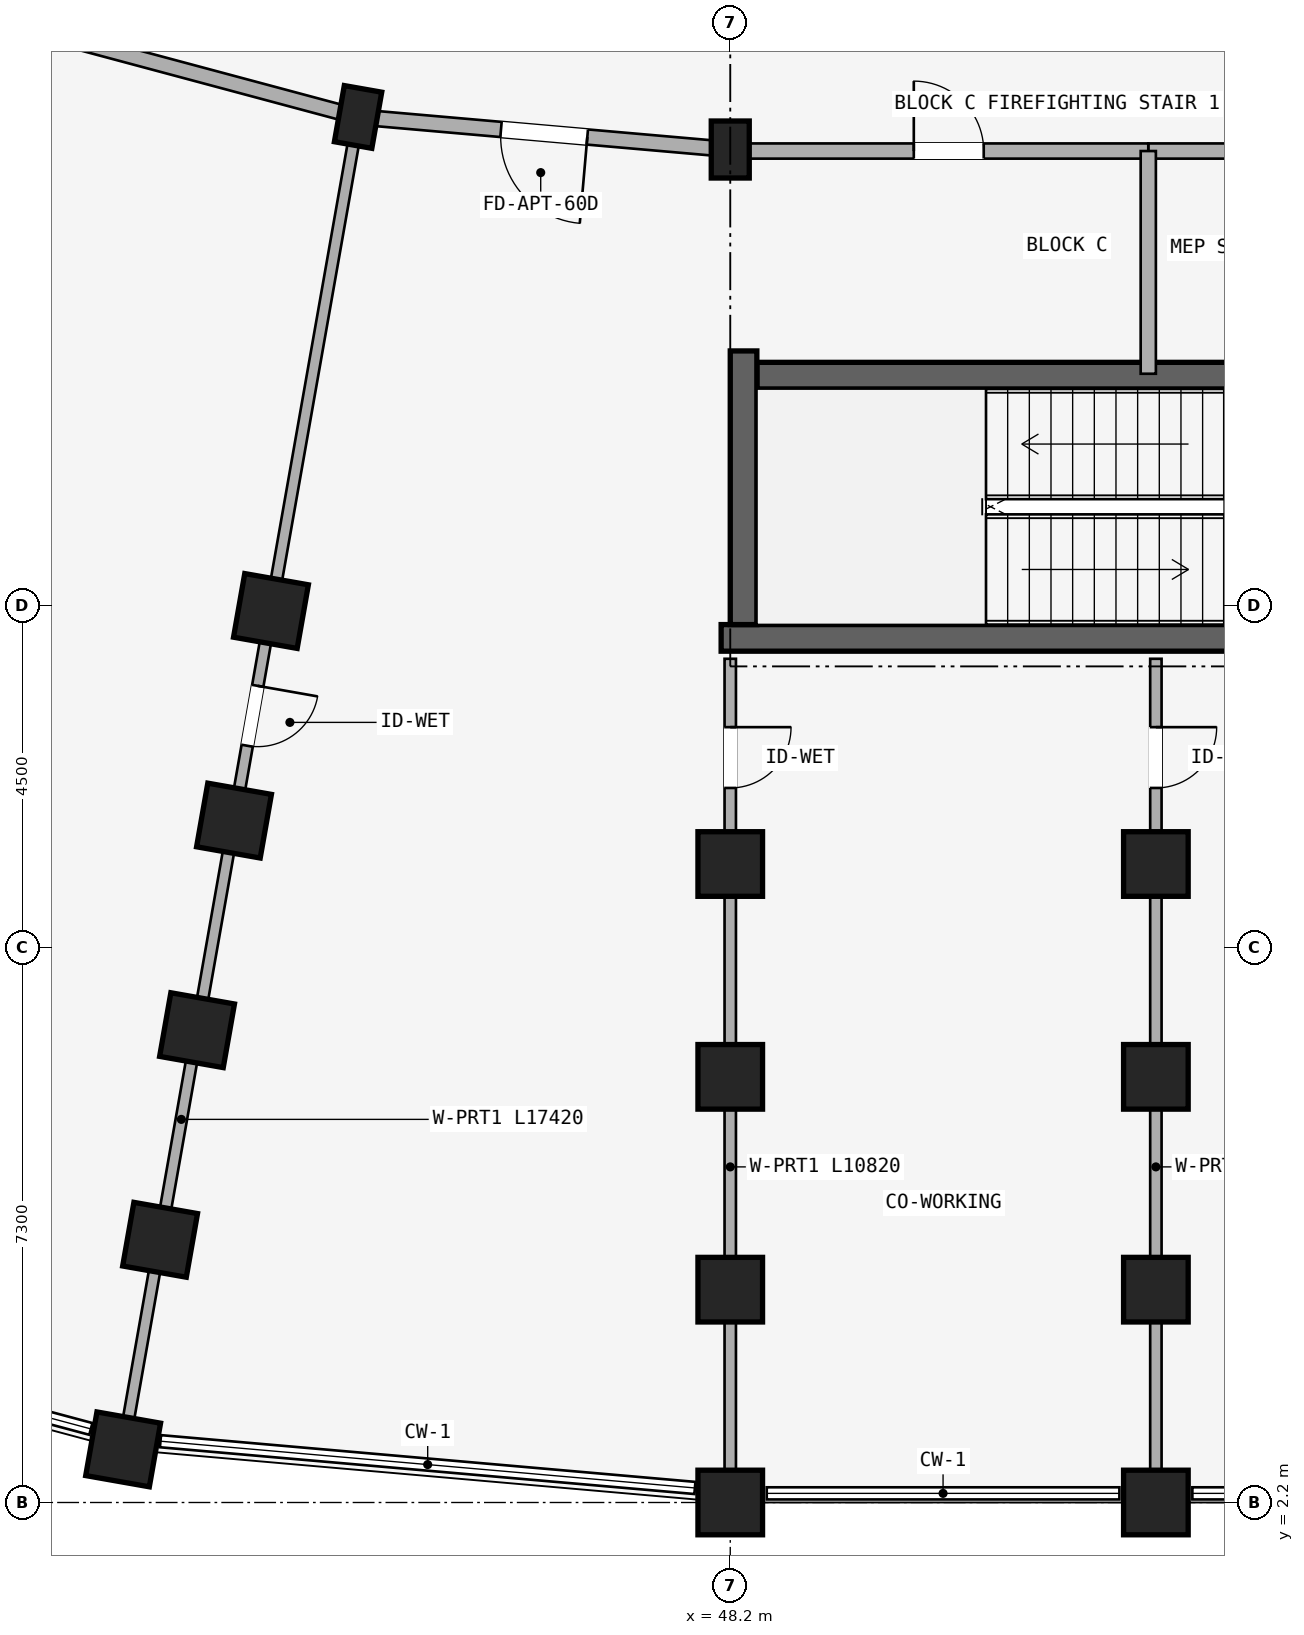
"""IFC4 building model, lengths in metres.
Left out: names, types, materials, properties, quantities, classifications, styles, units other than length and angle.
Written with IfcOpenShell. Run it as: python <this file> out.ifc"""

import sys

from ifc_helpers import new_model, si_unit, direction, frame, frame_2d, origin, origin_2d, place, context, subcontext, project, spatial, rectangle, extrude, element, fill, save


model = new_model("IFC4")
c1 = context("Model", 3, precision=1e-05, world=origin(), true_north=direction((0.0, 1.0)))
c2 = subcontext(c1, "Body", "Model", "MODEL_VIEW")
j1 = project(units=[si_unit("LENGTHUNIT", "METRE"), si_unit("PLANEANGLEUNIT", "RADIAN")], contexts=[c1])
p1 = place(None, origin())
s1 = spatial("IfcSite", under=j1, at=p1, CompositionType="ELEMENT")
p2 = place(p1, origin())
s2 = spatial("IfcBuilding", under=s1, at=p2, CompositionType="ELEMENT")
p3 = place(p2, frame((0.0, 0.0, 4.5)))
s3 = spatial("IfcBuildingStorey", under=s2, at=p3, CompositionType="ELEMENT", Elevation=4.5)
p4 = place(p3, frame((48.08, 13.575, 0.0), z_axis=(0.0, 0.0, 1.0), x_axis=(1.0, 0.0, 0.0)))
e1 = element("IfcWall", 1, at=p4, inside=s3, PredefinedType="SHEAR", context=c2, shape_type="SweptSolid", body=[
    extrude(rectangle(XDim=8.545, YDim=0.35, at=frame_2d((4.272, 0.0))), origin(), (0.0, 0.0, 1.0), 3.98),
])
p5 = place(p3, frame((48.55, 17.025, 0.0), z_axis=(0.0, 0.0, 1.0), x_axis=(1.0, 0.0, 0.0)))
e2 = element("IfcWall", 2, at=p5, inside=s3, PredefinedType="SHEAR", context=c2, shape_type="SweptSolid", body=[
    extrude(rectangle(XDim=8.075, YDim=0.35, at=frame_2d((4.038, 0.0))), origin(), (0.0, 0.0, 1.0), 3.98),
])
p6 = place(p5, frame((6.38, 0.0, 0.0)))
e3 = element("IfcOpeningElement", 3, at=p6, cuts=e2, PredefinedType="OPENING", context=c2, shape_type="SweptSolid", body=[
    extrude(rectangle(XDim=1.24, YDim=2.15, at=frame_2d((0.62, 1.075))), frame((0.0, 0.185, 0.0), z_axis=(0.0, -1.0, 0.0), x_axis=(1.0, 0.0, 0.0)), (0.0, 0.0, 1.0), 0.37),
])
p7 = place(p3, frame((48.375, 17.35, 0.0), z_axis=(0.0, 0.0, 1.0), x_axis=(0.0, -1.0, 0.0)))
e4 = element("IfcWall", 4, at=p7, inside=s3, PredefinedType="SHEAR", context=c2, shape_type="SweptSolid", body=[
    extrude(rectangle(XDim=3.6, YDim=0.35, at=frame_2d((1.8, 0.0))), origin(), (0.0, 0.0, 1.0), 3.98),
])
p8 = place(p3, frame((48.2, 20.0, 0.0), z_axis=(0.0, 0.0, 1.0), x_axis=(1.0, 0.0, 0.0)))
e5 = element("IfcColumn", 5, at=p8, inside=s3, PredefinedType="COLUMN", context=c2, shape_type="SweptSolid", body=[
    extrude(rectangle(XDim=0.5, YDim=0.75, at=origin_2d()), origin(), (0.0, 0.0, 1.0), 3.98),
])
for number, where, z_axis, x_axis in (
    (6, (48.2, 10.6, 0.0), (0.0, 0.0, 1.0), (1.0, 0.0, 0.0)),
    (7, (48.2, 7.8, 0.0), (0.0, 0.0, 1.0), (1.0, 0.0, 0.0)),
    (8, (48.2, 5.0, 0.0), (0.0, 0.0, 1.0), (1.0, 0.0, 0.0)),
    (9, (48.2, 2.2, 0.0), (0.0, 0.0, 1.0), (1.0, 0.0, 0.0)),
):
    element("IfcColumn", number, at=place(p3, frame(where, z_axis=z_axis, x_axis=x_axis)), inside=s3, PredefinedType="COLUMN", context=c2, shape_type="SweptSolid", body=[
        extrude(rectangle(XDim=0.85, YDim=0.85, at=origin_2d()), origin(), (0.0, 0.0, 1.0), 3.98),
    ])
p9 = place(p3, frame((43.303, 20.428, 0.0), z_axis=(0.0, 0.0, 1.0), x_axis=(-0.984807753012, 0.173648177667, 0.0)))
e10 = element("IfcColumn", 10, at=p9, inside=s3, PredefinedType="COLUMN", context=c2, shape_type="SweptSolid", body=[
    extrude(rectangle(XDim=0.5, YDim=0.75, at=origin_2d()), origin(), (0.0, 0.0, 1.0), 3.98),
])
for number, where, z_axis, x_axis in (
    (11, (42.157, 13.929, 0.0), (0.0, 0.0, 1.0), (-0.985, 0.174, 0.0)),
    (12, (41.671, 11.171, 0.0), (0.0, 0.0, 1.0), (-0.985, 0.174, 0.0)),
    (13, (41.185, 8.414, 0.0), (0.0, 0.0, 1.0), (-0.985, 0.174, 0.0)),
    (14, (40.698, 5.656, 0.0), (0.0, 0.0, 1.0), (-0.985, 0.174, 0.0)),
    (15, (40.212, 2.899, 0.0), (0.0, 0.0, 1.0), (-0.985, 0.174, 0.0)),
    (16, (53.8, 10.6, 0.0), (0.0, 0.0, 1.0), (1.0, 0.0, 0.0)),
    (17, (53.8, 7.8, 0.0), (0.0, 0.0, 1.0), (1.0, 0.0, 0.0)),
    (18, (53.8, 5.0, 0.0), (0.0, 0.0, 1.0), (1.0, 0.0, 0.0)),
    (19, (53.8, 2.2, 0.0), (0.0, 0.0, 1.0), (1.0, 0.0, 0.0)),
):
    element("IfcColumn", number, at=place(p3, frame(where, z_axis=z_axis, x_axis=x_axis)), inside=s3, PredefinedType="COLUMN", context=c2, shape_type="SweptSolid", body=[
        extrude(rectangle(XDim=0.85, YDim=0.85, at=origin_2d()), origin(), (0.0, 0.0, 1.0), 3.98),
    ])
p10 = place(p3, frame((53.7, 19.98, 0.0), z_axis=(0.0, 0.0, 1.0), x_axis=(1.0, 0.0, 0.0)))
e20 = element("IfcWall", 20, at=p10, inside=s3, PredefinedType="STANDARD", context=c2, shape_type="SweptSolid", body=[
    extrude(rectangle(XDim=5.65, YDim=0.2, at=frame_2d((2.825, 0.0))), origin(), (0.0, 0.0, 1.0), 3.322),
])
p11 = place(p10, frame((1.923, 0.0, 0.0)))
e21 = element("IfcOpeningElement", 21, at=p11, cuts=e20, PredefinedType="OPENING", context=c2, shape_type="SweptSolid", body=[
    extrude(rectangle(XDim=1.24, YDim=2.15, at=frame_2d((0.62, 1.075))), frame((0.0, 0.11, 0.0), z_axis=(0.0, -1.0, 0.0), x_axis=(1.0, 0.0, 0.0)), (0.0, 0.0, 1.0), 0.22),
])
p12 = place(p3, frame((48.45, 19.98, 0.0), z_axis=(0.0, 0.0, 1.0), x_axis=(1.0, 0.0, 0.0)))
e22 = element("IfcWall", 22, at=p12, inside=s3, PredefinedType="STANDARD", context=c2, shape_type="SweptSolid", body=[
    extrude(rectangle(XDim=5.25, YDim=0.2, at=frame_2d((2.625, 0.0))), origin(), (0.0, 0.0, 1.0), 3.322),
])
p13 = place(p12, frame((2.165, 0.0, 0.0)))
e23 = element("IfcOpeningElement", 23, at=p13, cuts=e22, PredefinedType="OPENING", context=c2, shape_type="SweptSolid", body=[
    extrude(rectangle(XDim=0.92, YDim=2.1, at=frame_2d((0.46, 1.05))), frame((0.0, 0.11, 0.0), z_axis=(0.0, -1.0, 0.0), x_axis=(1.0, 0.0, 0.0)), (0.0, 0.0, 1.0), 0.22),
])
p14 = place(p3, frame((53.7, 19.98, 0.0), z_axis=(0.0, 0.0, 1.0), x_axis=(0.0, -1.0, 0.0)))
e24 = element("IfcWall", 24, at=p14, inside=s3, PredefinedType="STANDARD", context=c2, shape_type="SweptSolid", body=[
    extrude(rectangle(XDim=2.93, YDim=0.2, at=frame_2d((1.465, 0.0))), origin(), (0.0, 0.0, 1.0), 3.322),
])
p15 = place(p3, frame((53.8, 13.3, 0.0), z_axis=(0.0, 0.0, 1.0), x_axis=(0.0, -1.0, 0.0)))
e25 = element("IfcWall", 25, at=p15, inside=s3, PredefinedType="PARTITIONING", context=c2, shape_type="SweptSolid", body=[
    extrude(rectangle(XDim=10.82, YDim=0.15, at=frame_2d((5.41, 0.0))), origin(), (0.0, 0.0, 1.0), 3.322),
])
p16 = place(p15, frame((0.899, 0.0, 0.0)))
e26 = element("IfcOpeningElement", 26, at=p16, cuts=e25, PredefinedType="OPENING", context=c2, shape_type="SweptSolid", body=[
    extrude(rectangle(XDim=0.8, YDim=2.1, at=frame_2d((0.4, 1.05))), frame((0.0, 0.085, 0.0), z_axis=(0.0, -1.0, 0.0), x_axis=(1.0, 0.0, 0.0)), (0.0, 0.0, 1.0), 0.17),
])
p17 = place(p3, frame((48.2, 20.0, 0.0), z_axis=(0.0, 0.0, 1.0), x_axis=(-0.996193663584, 0.087167566415, 0.0)))
e27 = element("IfcWall", 27, at=p17, inside=s3, PredefinedType="STANDARD", context=c2, shape_type="SweptSolid", body=[
    extrude(rectangle(XDim=4.916, YDim=0.2, at=frame_2d((2.458, 0.0))), origin(), (0.0, 0.0, 1.0), 3.322),
])
p18 = place(p17, frame((1.888, 0.0, 0.0)))
e28 = element("IfcOpeningElement", 28, at=p18, cuts=e27, PredefinedType="OPENING", context=c2, shape_type="SweptSolid", body=[
    extrude(rectangle(XDim=1.14, YDim=2.15, at=frame_2d((0.57, 1.075))), frame((0.0, 0.11, 0.0), z_axis=(0.0, -1.0, 0.0), x_axis=(1.0, 0.0, 0.0)), (0.0, 0.0, 1.0), 0.22),
])
p19 = place(p3, frame((43.303, 20.428, 0.0), z_axis=(0.0, 0.0, 1.0), x_axis=(-0.965930095386, 0.258803112091, 0.0)))
e29 = element("IfcWall", 29, at=p19, inside=s3, PredefinedType="STANDARD", context=c2, shape_type="SweptSolid", body=[
    extrude(rectangle(XDim=4.916, YDim=0.2, at=frame_2d((2.458, 0.0))), origin(), (0.0, 0.0, 1.0), 3.322),
])
p20 = place(p3, frame((48.2, 13.3, 0.0), z_axis=(0.0, 0.0, 1.0), x_axis=(0.0, -1.0, 0.0)))
e30 = element("IfcWall", 30, at=p20, inside=s3, PredefinedType="PARTITIONING", context=c2, shape_type="SweptSolid", body=[
    extrude(rectangle(XDim=10.82, YDim=0.15, at=frame_2d((5.41, 0.0))), origin(), (0.0, 0.0, 1.0), 3.322),
])
p21 = place(p20, frame((0.899, 0.0, 0.0)))
e31 = element("IfcOpeningElement", 31, at=p21, cuts=e30, PredefinedType="OPENING", context=c2, shape_type="SweptSolid", body=[
    extrude(rectangle(XDim=0.8, YDim=2.1, at=frame_2d((0.4, 1.05))), frame((0.0, 0.085, 0.0), z_axis=(0.0, -1.0, 0.0), x_axis=(1.0, 0.0, 0.0)), (0.0, 0.0, 1.0), 0.17),
])
p22 = place(p3, frame((43.286, 20.33, 0.0), z_axis=(0.0, 0.0, 1.0), x_axis=(-0.173646216546, -0.984808098809, 0.0)))
e32 = element("IfcWall", 32, at=p22, inside=s3, PredefinedType="PARTITIONING", context=c2, shape_type="SweptSolid", body=[
    extrude(rectangle(XDim=17.42, YDim=0.15, at=frame_2d((8.71, 0.0))), origin(), (0.0, 0.0, 1.0), 3.322),
])
p23 = place(p22, frame((7.5, 0.0, 0.0)))
e33 = element("IfcOpeningElement", 33, at=p23, cuts=e32, PredefinedType="OPENING", context=c2, shape_type="SweptSolid", body=[
    extrude(rectangle(XDim=0.8, YDim=2.1, at=frame_2d((0.4, 1.05))), frame((0.0, 0.085, 0.0), z_axis=(0.0, -1.0, 0.0), x_axis=(1.0, 0.0, 0.0)), (0.0, 0.0, 1.0), 0.17),
])
p24 = place(p13, frame((0.92, 0.0, 0.0), z_axis=(0.0, 0.0, 1.0), x_axis=(-1.0, 0.0, 0.0)))
e34 = element("IfcDoor", 34, at=p24, inside=s3, OperationType="SINGLE_SWING_RIGHT", PredefinedType="DOOR", context=c2, shape_type="SweptSolid", body=[
    extrude(rectangle(XDim=0.92, YDim=2.1, at=frame_2d((0.46, 1.05))), frame((0.0, 0.025, 0.0), z_axis=(0.0, -1.0, 0.0), x_axis=(1.0, 0.0, 0.0)), (0.0, 0.0, 1.0), 0.05),
])
fill(e23, e34)
p25 = place(p16, frame((0.8, 0.0, 0.0), z_axis=(0.0, 0.0, 1.0), x_axis=(-1.0, 0.0, 0.0)))
e35 = element("IfcDoor", 35, at=p25, inside=s3, OperationType="SINGLE_SWING_RIGHT", PredefinedType="DOOR", context=c2, shape_type="SweptSolid", body=[
    extrude(rectangle(XDim=0.8, YDim=2.1, at=frame_2d((0.4, 1.05))), frame((0.0, 0.025, 0.0), z_axis=(0.0, -1.0, 0.0), x_axis=(1.0, 0.0, 0.0)), (0.0, 0.0, 1.0), 0.05),
])
fill(e26, e35)
p26 = place(p21, frame((0.8, 0.0, 0.0), z_axis=(0.0, 0.0, 1.0), x_axis=(-1.0, 0.0, 0.0)))
e36 = element("IfcDoor", 36, at=p26, inside=s3, OperationType="SINGLE_SWING_RIGHT", PredefinedType="DOOR", context=c2, shape_type="SweptSolid", body=[
    extrude(rectangle(XDim=0.8, YDim=2.1, at=frame_2d((0.4, 1.05))), frame((0.0, 0.025, 0.0), z_axis=(0.0, -1.0, 0.0), x_axis=(1.0, 0.0, 0.0)), (0.0, 0.0, 1.0), 0.05),
])
fill(e31, e36)
p27 = place(p23, frame((0.8, 0.0, 0.0), z_axis=(0.0, 0.0, 1.0), x_axis=(-1.0, 0.0, 0.0)))
e37 = element("IfcDoor", 37, at=p27, inside=s3, OperationType="SINGLE_SWING_RIGHT", PredefinedType="DOOR", context=c2, shape_type="SweptSolid", body=[
    extrude(rectangle(XDim=0.8, YDim=2.1, at=frame_2d((0.4, 1.05))), frame((0.0, 0.025, 0.0), z_axis=(0.0, -1.0, 0.0), x_axis=(1.0, 0.0, 0.0)), (0.0, 0.0, 1.0), 0.05),
])
fill(e33, e37)
p28 = place(p18, frame((1.14, 0.0, 0.0), z_axis=(0.0, 0.0, 1.0), x_axis=(-1.0, 0.0, 0.0)))
e38 = element("IfcDoor", 38, at=p28, inside=s3, OperationType="SINGLE_SWING_RIGHT", PredefinedType="DOOR", context=c2, shape_type="SweptSolid", body=[
    extrude(rectangle(XDim=1.14, YDim=2.15, at=frame_2d((0.57, 1.075))), frame((0.0, 0.025, 0.0), z_axis=(0.0, -1.0, 0.0), x_axis=(1.0, 0.0, 0.0)), (0.0, 0.0, 1.0), 0.05),
])
fill(e28, e38)
save(model, sys.argv[1])
